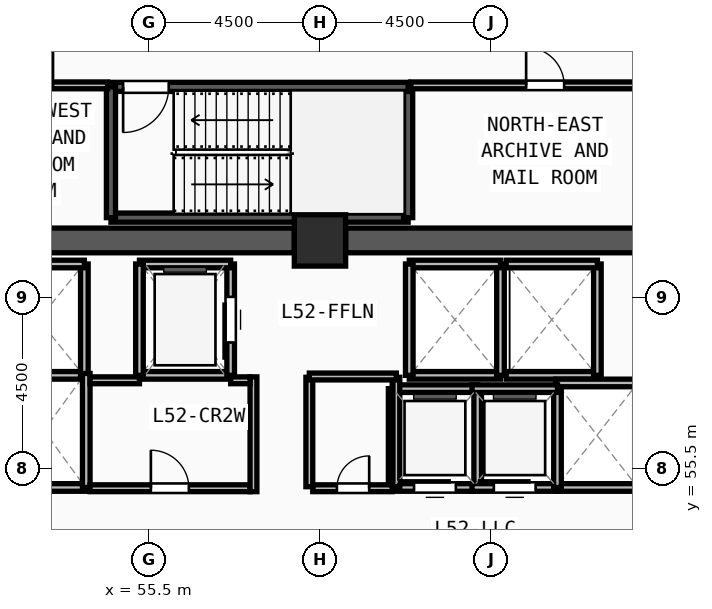
"""IFC4 building model, lengths in metres.
Left out: names, types, materials, properties, quantities, classifications, styles, units other than length and angle.
Written with IfcOpenShell. Run it as: python <this file> out.ifc"""

import sys

from ifc_helpers import new_model, si_unit, direction, frame, frame_2d, origin, origin_2d, place, context, subcontext, project, spatial, rectangle, extrude, source, transform, mapped, element, fill, save


model = new_model("IFC4")
c1 = context("Model", 3, precision=1e-05, world=origin(), true_north=direction((0.0, 1.0)))
c2 = subcontext(c1, "Body", "Model", "MODEL_VIEW")
j1 = project(units=[si_unit("LENGTHUNIT", "METRE"), si_unit("PLANEANGLEUNIT", "RADIAN")], contexts=[c1])
p1 = place(None, origin())
s1 = spatial("IfcSite", under=j1, at=p1, CompositionType="ELEMENT")
p2 = place(p1, origin())
s2 = spatial("IfcBuilding", under=s1, at=p2, CompositionType="ELEMENT")
p3 = place(p2, frame((0.0, 0.0, 201.75)))
s3 = spatial("IfcBuildingStorey", under=s2, at=p3, CompositionType="ELEMENT", Elevation=201.75)
m1 = source(origin(), c2, "Body", "SweptSolid", [
    extrude(rectangle(XDim=1.35, YDim=1.35, at=origin_2d()), origin(), (0.0, 0.0, 1.0), 3.75),
])
p4 = place(p3, frame((60.0, 61.5, 0.0), z_axis=(0.0, 0.0, 1.0), x_axis=(1.0, 0.0, 0.0)))
e1 = element("IfcColumn", 1, at=p4, inside=s3, PredefinedType="COLUMN", context=c2, shape_type="MappedRepresentation", body=[
    mapped(m1, transform((0.0, 0.0, 0.0), x_axis=(1.0, 0.0, 0.0), y_axis=(0.0, 1.0, 0.0), z_axis=(0.0, 0.0, 1.0), scale=1.0)),
])
for number, where, z_axis, x_axis in (
    (2, (51.675, 61.5, 0.0), (0.0, 0.0, 1.0), (1.0, 0.0, 0.0)),
    (3, (60.675, 61.5, 0.0), (0.0, 0.0, 1.0), (1.0, 0.0, 0.0)),
):
    element("IfcWall", number, at=place(p3, frame(where, z_axis=z_axis, x_axis=x_axis)), inside=s3, PredefinedType="SHEAR", context=c2, shape_type="SweptSolid", body=[
        extrude(rectangle(XDim=7.65, YDim=0.65, at=frame_2d((3.825, 0.0))), origin(), (0.0, 0.0, 1.0), 3.57),
    ])
p5 = place(p3, frame((54.5, 62.1, 0.0), z_axis=(0.0, 0.0, 1.0), x_axis=(1.0, 0.0, 0.0)))
e4 = element("IfcWall", 4, at=p5, inside=s3, PredefinedType="SOLIDWALL", context=c2, shape_type="SweptSolid", body=[
    extrude(rectangle(XDim=7.82, YDim=0.24, at=frame_2d((3.91, 0.0))), origin(), (0.0, 0.0, 1.0), 3.57),
])
p6 = place(p3, frame((62.32, 62.1, 0.0), z_axis=(0.0, 0.0, 1.0), x_axis=(0.0, 1.0, 0.0)))
e5 = element("IfcWall", 5, at=p6, inside=s3, PredefinedType="SOLIDWALL", context=c2, shape_type="SweptSolid", body=[
    extrude(rectangle(XDim=3.44, YDim=0.24, at=frame_2d((1.72, 0.0))), origin(), (0.0, 0.0, 1.0), 3.57),
])
p7 = place(p3, frame((62.32, 65.54, 0.0), z_axis=(0.0, 0.0, 1.0), x_axis=(-1.0, 0.0, 0.0)))
e6 = element("IfcWall", 6, at=p7, inside=s3, PredefinedType="SOLIDWALL", context=c2, shape_type="SweptSolid", body=[
    extrude(rectangle(XDim=7.82, YDim=0.24, at=frame_2d((3.91, 0.0))), origin(), (0.0, 0.0, 1.0), 3.57),
])
m2 = source(origin(), c2, "Body", "SweptSolid", [
    extrude(rectangle(XDim=1.2, YDim=2.2, at=frame_2d((0.6, 1.1))), frame((0.0, 0.13, 0.0), z_axis=(0.0, -1.0, 0.0), x_axis=(1.0, 0.0, 0.0)), (0.0, 0.0, 1.0), 0.26),
])
p8 = place(p7, frame((6.3, 0.0, 0.0)))
e7 = element("IfcOpeningElement", 7, at=p8, cuts=e6, PredefinedType="OPENING", context=c2, shape_type="MappedRepresentation", body=[
    mapped(m2, transform((0.0, 0.0, 0.0), x_axis=(1.0, 0.0, 0.0), y_axis=(0.0, 1.0, 0.0), z_axis=(0.0, 0.0, 1.0), scale=1.0)),
])
p9 = place(p3, frame((54.5, 65.54, 0.0), z_axis=(0.0, 0.0, 1.0), x_axis=(0.0, -1.0, 0.0)))
e8 = element("IfcWall", 8, at=p9, inside=s3, PredefinedType="SOLIDWALL", context=c2, shape_type="SweptSolid", body=[
    extrude(rectangle(XDim=3.44, YDim=0.24, at=frame_2d((1.72, 0.0))), origin(), (0.0, 0.0, 1.0), 3.57),
])
p10 = place(p3, frame((55.25, 57.95, 0.0), z_axis=(0.0, 0.0, 1.0), x_axis=(1.0, 0.0, 0.0)))
e9 = element("IfcWall", 9, at=p10, inside=s3, PredefinedType="SOLIDWALL", context=c2, shape_type="SweptSolid", body=[
    extrude(rectangle(XDim=2.4, YDim=0.2, at=frame_2d((1.2, 0.0))), origin(), (0.0, 0.0, 1.0), 3.57),
])
p11 = place(p3, frame((57.65, 57.95, 0.0), z_axis=(0.0, 0.0, 1.0), x_axis=(0.0, 1.0, 0.0)))
e10 = element("IfcWall", 10, at=p11, inside=s3, PredefinedType="SOLIDWALL", context=c2, shape_type="SweptSolid", body=[
    extrude(rectangle(XDim=2.93, YDim=0.2, at=frame_2d((1.465, 0.0))), origin(), (0.0, 0.0, 1.0), 3.57),
])
m3 = source(origin(), c2, "Body", "SweptSolid", [
    extrude(rectangle(XDim=1.2, YDim=2.3, at=frame_2d((0.6, 1.15))), frame((0.0, 0.11, 0.0), z_axis=(0.0, -1.0, 0.0), x_axis=(1.0, 0.0, 0.0)), (0.0, 0.0, 1.0), 0.22),
])
p12 = place(p11, frame((0.865, 0.0, 0.0)))
e11 = element("IfcOpeningElement", 11, at=p12, cuts=e10, PredefinedType="OPENING", context=c2, shape_type="MappedRepresentation", body=[
    mapped(m3, transform((0.0, 0.0, 0.0), x_axis=(1.0, 0.0, 0.0), y_axis=(0.0, 1.0, 0.0), z_axis=(0.0, 0.0, 1.0), scale=1.0)),
])
p13 = place(p3, frame((57.65, 60.88, 0.0), z_axis=(0.0, 0.0, 1.0), x_axis=(-1.0, 0.0, 0.0)))
e12 = element("IfcWall", 12, at=p13, inside=s3, PredefinedType="SOLIDWALL", context=c2, shape_type="SweptSolid", body=[
    extrude(rectangle(XDim=2.4, YDim=0.2, at=frame_2d((1.2, 0.0))), origin(), (0.0, 0.0, 1.0), 3.57),
])
p14 = place(p3, frame((55.25, 60.88, 0.0), z_axis=(0.0, 0.0, 1.0), x_axis=(0.0, -1.0, 0.0)))
e13 = element("IfcWall", 13, at=p14, inside=s3, PredefinedType="SOLIDWALL", context=c2, shape_type="SweptSolid", body=[
    extrude(rectangle(XDim=2.93, YDim=0.2, at=frame_2d((1.465, 0.0))), origin(), (0.0, 0.0, 1.0), 3.57),
])
p15 = place(p3, frame((62.35, 57.95, 0.0), z_axis=(0.0, 0.0, 1.0), x_axis=(1.0, 0.0, 0.0)))
e14 = element("IfcWall", 14, at=p15, inside=s3, PredefinedType="SOLIDWALL", context=c2, shape_type="SweptSolid", body=[
    extrude(rectangle(XDim=2.4, YDim=0.2, at=frame_2d((1.2, 0.0))), origin(), (0.0, 0.0, 1.0), 3.57),
])
p16 = place(p3, frame((64.75, 57.95, 0.0), z_axis=(0.0, 0.0, 1.0), x_axis=(0.0, 1.0, 0.0)))
e15 = element("IfcWall", 15, at=p16, inside=s3, PredefinedType="SOLIDWALL", context=c2, shape_type="SweptSolid", body=[
    extrude(rectangle(XDim=2.93, YDim=0.2, at=frame_2d((1.465, 0.0))), origin(), (0.0, 0.0, 1.0), 3.57),
])
p17 = place(p3, frame((64.75, 60.88, 0.0), z_axis=(0.0, 0.0, 1.0), x_axis=(-1.0, 0.0, 0.0)))
e16 = element("IfcWall", 16, at=p17, inside=s3, PredefinedType="SOLIDWALL", context=c2, shape_type="SweptSolid", body=[
    extrude(rectangle(XDim=2.4, YDim=0.2, at=frame_2d((1.2, 0.0))), origin(), (0.0, 0.0, 1.0), 3.57),
])
p18 = place(p3, frame((62.35, 60.88, 0.0), z_axis=(0.0, 0.0, 1.0), x_axis=(0.0, -1.0, 0.0)))
e17 = element("IfcWall", 17, at=p18, inside=s3, PredefinedType="SOLIDWALL", context=c2, shape_type="SweptSolid", body=[
    extrude(rectangle(XDim=2.93, YDim=0.2, at=frame_2d((1.465, 0.0))), origin(), (0.0, 0.0, 1.0), 3.57),
])
p19 = place(p3, frame((64.9, 57.95, 0.0), z_axis=(0.0, 0.0, 1.0), x_axis=(1.0, 0.0, 0.0)))
e18 = element("IfcWall", 18, at=p19, inside=s3, PredefinedType="SOLIDWALL", context=c2, shape_type="SweptSolid", body=[
    extrude(rectangle(XDim=2.4, YDim=0.2, at=frame_2d((1.2, 0.0))), origin(), (0.0, 0.0, 1.0), 3.57),
])
p20 = place(p3, frame((67.3, 57.95, 0.0), z_axis=(0.0, 0.0, 1.0), x_axis=(0.0, 1.0, 0.0)))
e19 = element("IfcWall", 19, at=p20, inside=s3, PredefinedType="SOLIDWALL", context=c2, shape_type="SweptSolid", body=[
    extrude(rectangle(XDim=2.93, YDim=0.2, at=frame_2d((1.465, 0.0))), origin(), (0.0, 0.0, 1.0), 3.57),
])
for number, where, z_axis, x_axis in (
    (20, (67.3, 60.88, 0.0), (0.0, 0.0, 1.0), (-1.0, 0.0, 0.0)),
    (21, (51.4, 57.95, 0.0), (0.0, 0.0, 1.0), (1.0, 0.0, 0.0)),
):
    element("IfcWall", number, at=place(p3, frame(where, z_axis=z_axis, x_axis=x_axis)), inside=s3, PredefinedType="SOLIDWALL", context=c2, shape_type="SweptSolid", body=[
        extrude(rectangle(XDim=2.4, YDim=0.2, at=frame_2d((1.2, 0.0))), origin(), (0.0, 0.0, 1.0), 3.57),
    ])
p21 = place(p3, frame((53.8, 57.95, 0.0), z_axis=(0.0, 0.0, 1.0), x_axis=(0.0, 1.0, 0.0)))
e22 = element("IfcWall", 22, at=p21, inside=s3, PredefinedType="SOLIDWALL", context=c2, shape_type="SweptSolid", body=[
    extrude(rectangle(XDim=2.93, YDim=0.2, at=frame_2d((1.465, 0.0))), origin(), (0.0, 0.0, 1.0), 3.57),
])
p22 = place(p3, frame((53.8, 60.88, 0.0), z_axis=(0.0, 0.0, 1.0), x_axis=(-1.0, 0.0, 0.0)))
e23 = element("IfcWall", 23, at=p22, inside=s3, PredefinedType="SOLIDWALL", context=c2, shape_type="SweptSolid", body=[
    extrude(rectangle(XDim=2.4, YDim=0.2, at=frame_2d((1.2, 0.0))), origin(), (0.0, 0.0, 1.0), 3.57),
])
p23 = place(p3, frame((51.62, 55.0, 0.0), z_axis=(0.0, 0.0, 1.0), x_axis=(1.0, 0.0, 0.0)))
e24 = element("IfcWall", 24, at=p23, inside=s3, PredefinedType="SOLIDWALL", context=c2, shape_type="SweptSolid", body=[
    extrude(rectangle(XDim=2.23, YDim=0.2, at=frame_2d((1.115, 0.0))), origin(), (0.0, 0.0, 1.0), 3.57),
])
p24 = place(p3, frame((53.85, 55.0, 0.0), z_axis=(0.0, 0.0, 1.0), x_axis=(0.0, 1.0, 0.0)))
e25 = element("IfcWall", 25, at=p24, inside=s3, PredefinedType="SOLIDWALL", context=c2, shape_type="SweptSolid", body=[
    extrude(rectangle(XDim=3.0, YDim=0.2, at=frame_2d((1.5, 0.0))), origin(), (0.0, 0.0, 1.0), 3.57),
])
for number, where, z_axis, x_axis in (
    (26, (66.2, 55.0, 0.0), (0.0, 0.0, 1.0), (1.0, 0.0, 0.0)),
    (27, (68.38, 57.75, 0.0), (0.0, 0.0, 1.0), (-1.0, 0.0, 0.0)),
):
    element("IfcWall", number, at=place(p3, frame(where, z_axis=z_axis, x_axis=x_axis)), inside=s3, PredefinedType="SOLIDWALL", context=c2, shape_type="SweptSolid", body=[
        extrude(rectangle(XDim=2.18, YDim=0.2, at=frame_2d((1.09, 0.0))), origin(), (0.0, 0.0, 1.0), 3.57),
    ])
p25 = place(p3, frame((61.9, 55.0, 0.0), z_axis=(0.0, 0.0, 1.0), x_axis=(1.0, 0.0, 0.0)))
e28 = element("IfcWall", 28, at=p25, inside=s3, PredefinedType="SOLIDWALL", context=c2, shape_type="SweptSolid", body=[
    extrude(rectangle(XDim=2.25, YDim=0.2, at=frame_2d((1.125, 0.0))), origin(), (0.0, 0.0, 1.0), 3.57),
])
m4 = source(origin(), c2, "Body", "SweptSolid", [
    extrude(rectangle(XDim=1.1, YDim=2.2, at=frame_2d((0.55, 1.1))), frame((0.0, 0.11, 0.0), z_axis=(0.0, -1.0, 0.0), x_axis=(1.0, 0.0, 0.0)), (0.0, 0.0, 1.0), 0.22),
])
p26 = place(p25, frame((0.575, 0.0, 0.0)))
e29 = element("IfcOpeningElement", 29, at=p26, cuts=e28, PredefinedType="OPENING", context=c2, shape_type="MappedRepresentation", body=[
    mapped(m4, transform((0.0, 0.0, 0.0), x_axis=(1.0, 0.0, 0.0), y_axis=(0.0, 1.0, 0.0), z_axis=(0.0, 0.0, 1.0), scale=1.0)),
])
p27 = place(p3, frame((64.15, 55.0, 0.0), z_axis=(0.0, 0.0, 1.0), x_axis=(0.0, 1.0, 0.0)))
e30 = element("IfcWall", 30, at=p27, inside=s3, PredefinedType="SOLIDWALL", context=c2, shape_type="SweptSolid", body=[
    extrude(rectangle(XDim=2.6, YDim=0.2, at=frame_2d((1.3, 0.0))), origin(), (0.0, 0.0, 1.0), 3.57),
])
p28 = place(p3, frame((64.15, 57.6, 0.0), z_axis=(0.0, 0.0, 1.0), x_axis=(-1.0, 0.0, 0.0)))
e31 = element("IfcWall", 31, at=p28, inside=s3, PredefinedType="SOLIDWALL", context=c2, shape_type="SweptSolid", body=[
    extrude(rectangle(XDim=2.25, YDim=0.2, at=frame_2d((1.125, 0.0))), origin(), (0.0, 0.0, 1.0), 3.57),
])
p29 = place(p3, frame((61.9, 57.6, 0.0), z_axis=(0.0, 0.0, 1.0), x_axis=(0.0, -1.0, 0.0)))
e32 = element("IfcWall", 32, at=p29, inside=s3, PredefinedType="SOLIDWALL", context=c2, shape_type="SweptSolid", body=[
    extrude(rectangle(XDim=2.6, YDim=0.2, at=frame_2d((1.3, 0.0))), origin(), (0.0, 0.0, 1.0), 3.57),
])
p30 = place(p3, frame((64.0, 55.0, 0.0), z_axis=(0.0, 0.0, 1.0), x_axis=(1.0, 0.0, 0.0)))
e33 = element("IfcWall", 33, at=p30, inside=s3, PredefinedType="SOLIDWALL", context=c2, shape_type="SweptSolid", body=[
    extrude(rectangle(XDim=2.25, YDim=0.2, at=frame_2d((1.125, 0.0))), origin(), (0.0, 0.0, 1.0), 3.57),
])
p31 = place(p30, frame((0.575, 0.0, 0.0)))
e34 = element("IfcOpeningElement", 34, at=p31, cuts=e33, PredefinedType="OPENING", context=c2, shape_type="MappedRepresentation", body=[
    mapped(m4, transform((0.0, 0.0, 0.0), x_axis=(1.0, 0.0, 0.0), y_axis=(0.0, 1.0, 0.0), z_axis=(0.0, 0.0, 1.0), scale=1.0)),
])
p32 = place(p3, frame((66.25, 55.0, 0.0), z_axis=(0.0, 0.0, 1.0), x_axis=(0.0, 1.0, 0.0)))
e35 = element("IfcWall", 35, at=p32, inside=s3, PredefinedType="SOLIDWALL", context=c2, shape_type="SweptSolid", body=[
    extrude(rectangle(XDim=2.6, YDim=0.2, at=frame_2d((1.3, 0.0))), origin(), (0.0, 0.0, 1.0), 3.57),
])
p33 = place(p3, frame((66.25, 57.6, 0.0), z_axis=(0.0, 0.0, 1.0), x_axis=(-1.0, 0.0, 0.0)))
e36 = element("IfcWall", 36, at=p33, inside=s3, PredefinedType="SOLIDWALL", context=c2, shape_type="SweptSolid", body=[
    extrude(rectangle(XDim=2.25, YDim=0.2, at=frame_2d((1.125, 0.0))), origin(), (0.0, 0.0, 1.0), 3.57),
])
p34 = place(p3, frame((53.95, 54.98, 0.0), z_axis=(0.0, 0.0, 1.0), x_axis=(1.0, 0.0, 0.0)))
e37 = element("IfcWall", 37, at=p34, inside=s3, PredefinedType="PARTITIONING", context=c2, shape_type="SweptSolid", body=[
    extrude(rectangle(XDim=4.21, YDim=0.18, at=frame_2d((2.105, 0.0))), origin(), (0.0, 0.0, 1.0), 3.57),
])
m5 = source(origin(), c2, "Body", "SweptSolid", [
    extrude(rectangle(XDim=1.0, YDim=2.2, at=frame_2d((0.5, 1.1))), frame((0.0, 0.1, 0.0), z_axis=(0.0, -1.0, 0.0), x_axis=(1.0, 0.0, 0.0)), (0.0, 0.0, 1.0), 0.2),
])
p35 = place(p34, frame((1.6, 0.0, 0.0)))
e38 = element("IfcOpeningElement", 38, at=p35, cuts=e37, PredefinedType="OPENING", context=c2, shape_type="MappedRepresentation", body=[
    mapped(m5, transform((0.0, 0.0, 0.0), x_axis=(1.0, 0.0, 0.0), y_axis=(0.0, 1.0, 0.0), z_axis=(0.0, 0.0, 1.0), scale=1.0)),
])
p36 = place(p3, frame((59.81, 54.98, 0.0), z_axis=(0.0, 0.0, 1.0), x_axis=(1.0, 0.0, 0.0)))
e39 = element("IfcWall", 39, at=p36, inside=s3, PredefinedType="PARTITIONING", context=c2, shape_type="SweptSolid", body=[
    extrude(rectangle(XDim=2.09, YDim=0.18, at=frame_2d((1.045, 0.0))), origin(), (0.0, 0.0, 1.0), 3.57),
])
m6 = source(origin(), c2, "Body", "SweptSolid", [
    extrude(rectangle(XDim=0.85, YDim=2.1, at=frame_2d((0.425, 1.05))), frame((0.0, 0.1, 0.0), z_axis=(0.0, -1.0, 0.0), x_axis=(1.0, 0.0, 0.0)), (0.0, 0.0, 1.0), 0.2),
])
p37 = place(p36, frame((0.635, 0.0, 0.0)))
e40 = element("IfcOpeningElement", 40, at=p37, cuts=e39, PredefinedType="OPENING", context=c2, shape_type="MappedRepresentation", body=[
    mapped(m6, transform((0.0, 0.0, 0.0), x_axis=(1.0, 0.0, 0.0), y_axis=(0.0, 1.0, 0.0), z_axis=(0.0, 0.0, 1.0), scale=1.0)),
])
p38 = place(p3, frame((50.54, 65.58, 0.0), z_axis=(0.0, 0.0, 1.0), x_axis=(1.0, 0.0, 0.0)))
e41 = element("IfcWall", 41, at=p38, inside=s3, PredefinedType="PARTITIONING", context=c2, shape_type="SweptSolid", body=[
    extrude(rectangle(XDim=3.87, YDim=0.18, at=frame_2d((1.935, 0.0))), origin(), (0.0, 0.0, 1.0), 3.57),
])
p39 = place(p38, frame((1.435, 0.0, 0.0)))
e42 = element("IfcOpeningElement", 42, at=p39, cuts=e41, PredefinedType="OPENING", context=c2, shape_type="MappedRepresentation", body=[
    mapped(m5, transform((0.0, 0.0, 0.0), x_axis=(1.0, 0.0, 0.0), y_axis=(0.0, 1.0, 0.0), z_axis=(0.0, 0.0, 1.0), scale=1.0)),
])
p40 = place(p3, frame((62.39, 65.58, 0.0), z_axis=(0.0, 0.0, 1.0), x_axis=(1.0, 0.0, 0.0)))
e43 = element("IfcWall", 43, at=p40, inside=s3, PredefinedType="PARTITIONING", context=c2, shape_type="SweptSolid", body=[
    extrude(rectangle(XDim=7.07, YDim=0.18, at=frame_2d((3.535, 0.0))), origin(), (0.0, 0.0, 1.0), 3.57),
])
p41 = place(p40, frame((3.035, 0.0, 0.0)))
e44 = element("IfcOpeningElement", 44, at=p41, cuts=e43, PredefinedType="OPENING", context=c2, shape_type="MappedRepresentation", body=[
    mapped(m5, transform((0.0, 0.0, 0.0), x_axis=(1.0, 0.0, 0.0), y_axis=(0.0, 1.0, 0.0), z_axis=(0.0, 0.0, 1.0), scale=1.0)),
])
for number, where, z_axis, x_axis in (
    (45, (59.72, 55.02, 0.0), (0.0, 0.0, 1.0), (0.0, 1.0, 0.0)),
    (46, (62.01, 55.02, 0.0), (0.0, 0.0, 1.0), (0.0, 1.0, 0.0)),
):
    element("IfcWall", number, at=place(p3, frame(where, z_axis=z_axis, x_axis=x_axis)), inside=s3, PredefinedType="PARTITIONING", context=c2, shape_type="SweptSolid", body=[
        extrude(rectangle(XDim=2.88, YDim=0.18, at=frame_2d((1.44, 0.0))), origin(), (0.0, 0.0, 1.0), 3.57),
    ])
p42 = place(p3, frame((59.72, 57.92, 0.0), z_axis=(0.0, 0.0, 1.0), x_axis=(1.0, 0.0, 0.0)))
e47 = element("IfcWall", 47, at=p42, inside=s3, PredefinedType="PARTITIONING", context=c2, shape_type="SweptSolid", body=[
    extrude(rectangle(XDim=2.29, YDim=0.18, at=frame_2d((1.145, 0.0))), origin(), (0.0, 0.0, 1.0), 3.57),
])
p43 = place(p3, frame((58.25, 54.89, 0.0), z_axis=(0.0, 0.0, 1.0), x_axis=(0.0, 1.0, 0.0)))
e48 = element("IfcWall", 48, at=p43, inside=s3, PredefinedType="PARTITIONING", context=c2, shape_type="SweptSolid", body=[
    extrude(rectangle(XDim=3.02, YDim=0.18, at=frame_2d((1.51, 0.0))), origin(), (0.0, 0.0, 1.0), 3.57),
])
p44 = place(p3, frame((53.95, 57.82, 0.0), z_axis=(0.0, 0.0, 1.0), x_axis=(1.0, 0.0, 0.0)))
e49 = element("IfcWall", 49, at=p44, inside=s3, PredefinedType="PARTITIONING", context=c2, shape_type="SweptSolid", body=[
    extrude(rectangle(XDim=1.3, YDim=0.18, at=frame_2d((0.65, 0.0))), origin(), (0.0, 0.0, 1.0), 3.57),
])
p45 = place(p3, frame((57.65, 57.82, 0.0), z_axis=(0.0, 0.0, 1.0), x_axis=(1.0, 0.0, 0.0)))
e50 = element("IfcWall", 50, at=p45, inside=s3, PredefinedType="PARTITIONING", context=c2, shape_type="SweptSolid", body=[
    extrude(rectangle(XDim=0.51, YDim=0.18, at=frame_2d((0.255, 0.0))), origin(), (0.0, 0.0, 1.0), 3.57),
])
m7 = source(origin(), c2, "Body", "SweptSolid", [
    extrude(rectangle(XDim=1.2, YDim=2.2, at=frame_2d((0.6, 1.1))), frame((0.0, 0.025, 0.0), z_axis=(0.0, -1.0, 0.0), x_axis=(1.0, 0.0, 0.0)), (0.0, 0.0, 1.0), 0.05),
])
p46 = place(p8, origin())
e51 = element("IfcDoor", 51, at=p46, inside=s3, OperationType="SINGLE_SWING_RIGHT", PredefinedType="DOOR", context=c2, shape_type="MappedRepresentation", body=[
    mapped(m7, transform((0.0, 0.0, 0.0), x_axis=(1.0, 0.0, 0.0), y_axis=(0.0, 1.0, 0.0), z_axis=(0.0, 0.0, 1.0), scale=1.0)),
])
fill(e7, e51)
m8 = source(origin(), c2, "Body", "SweptSolid", [
    extrude(rectangle(XDim=1.2, YDim=2.3, at=frame_2d((0.6, 1.15))), frame((0.0, 0.025, 0.0), z_axis=(0.0, -1.0, 0.0), x_axis=(1.0, 0.0, 0.0)), (0.0, 0.0, 1.0), 0.05),
])
p47 = place(p12, origin())
e52 = element("IfcDoor", 52, at=p47, inside=s3, OperationType="SLIDING_TO_LEFT", PredefinedType="DOOR", context=c2, shape_type="MappedRepresentation", body=[
    mapped(m8, transform((0.0, 0.0, 0.0), x_axis=(1.0, 0.0, 0.0), y_axis=(0.0, 1.0, 0.0), z_axis=(0.0, 0.0, 1.0), scale=1.0)),
])
fill(e11, e52)
m9 = source(origin(), c2, "Body", "SweptSolid", [
    extrude(rectangle(XDim=1.1, YDim=2.2, at=frame_2d((0.55, 1.1))), frame((0.0, 0.025, 0.0), z_axis=(0.0, -1.0, 0.0), x_axis=(1.0, 0.0, 0.0)), (0.0, 0.0, 1.0), 0.05),
])
p48 = place(p26, origin())
e53 = element("IfcDoor", 53, at=p48, inside=s3, OperationType="SLIDING_TO_LEFT", PredefinedType="DOOR", context=c2, shape_type="MappedRepresentation", body=[
    mapped(m9, transform((0.0, 0.0, 0.0), x_axis=(1.0, 0.0, 0.0), y_axis=(0.0, 1.0, 0.0), z_axis=(0.0, 0.0, 1.0), scale=1.0)),
])
fill(e29, e53)
p49 = place(p31, origin())
e54 = element("IfcDoor", 54, at=p49, inside=s3, OperationType="SLIDING_TO_LEFT", PredefinedType="DOOR", context=c2, shape_type="MappedRepresentation", body=[
    mapped(m9, transform((0.0, 0.0, 0.0), x_axis=(1.0, 0.0, 0.0), y_axis=(0.0, 1.0, 0.0), z_axis=(0.0, 0.0, 1.0), scale=1.0)),
])
fill(e34, e54)
m10 = source(origin(), c2, "Body", "SweptSolid", [
    extrude(rectangle(XDim=1.0, YDim=2.2, at=frame_2d((0.5, 1.1))), frame((0.0, 0.025, 0.0), z_axis=(0.0, -1.0, 0.0), x_axis=(1.0, 0.0, 0.0)), (0.0, 0.0, 1.0), 0.05),
])
p50 = place(p35, origin())
e55 = element("IfcDoor", 55, at=p50, inside=s3, OperationType="SINGLE_SWING_LEFT", PredefinedType="DOOR", context=c2, shape_type="MappedRepresentation", body=[
    mapped(m10, transform((0.0, 0.0, 0.0), x_axis=(1.0, 0.0, 0.0), y_axis=(0.0, 1.0, 0.0), z_axis=(0.0, 0.0, 1.0), scale=1.0)),
])
fill(e38, e55)
m11 = source(origin(), c2, "Body", "SweptSolid", [
    extrude(rectangle(XDim=0.85, YDim=2.1, at=frame_2d((0.425, 1.05))), frame((0.0, 0.025, 0.0), z_axis=(0.0, -1.0, 0.0), x_axis=(1.0, 0.0, 0.0)), (0.0, 0.0, 1.0), 0.05),
])
p51 = place(p37, origin())
e56 = element("IfcDoor", 56, at=p51, inside=s3, OperationType="SINGLE_SWING_RIGHT", PredefinedType="DOOR", context=c2, shape_type="MappedRepresentation", body=[
    mapped(m11, transform((0.0, 0.0, 0.0), x_axis=(1.0, 0.0, 0.0), y_axis=(0.0, 1.0, 0.0), z_axis=(0.0, 0.0, 1.0), scale=1.0)),
])
fill(e40, e56)
p52 = place(p39, origin())
e57 = element("IfcDoor", 57, at=p52, inside=s3, OperationType="SINGLE_SWING_RIGHT", PredefinedType="DOOR", context=c2, shape_type="MappedRepresentation", body=[
    mapped(m10, transform((0.0, 0.0, 0.0), x_axis=(1.0, 0.0, 0.0), y_axis=(0.0, 1.0, 0.0), z_axis=(0.0, 0.0, 1.0), scale=1.0)),
])
fill(e42, e57)
p53 = place(p41, origin())
e58 = element("IfcDoor", 58, at=p53, inside=s3, OperationType="SINGLE_SWING_LEFT", PredefinedType="DOOR", context=c2, shape_type="MappedRepresentation", body=[
    mapped(m10, transform((0.0, 0.0, 0.0), x_axis=(1.0, 0.0, 0.0), y_axis=(0.0, 1.0, 0.0), z_axis=(0.0, 0.0, 1.0), scale=1.0)),
])
fill(e44, e58)
save(model, sys.argv[1])
